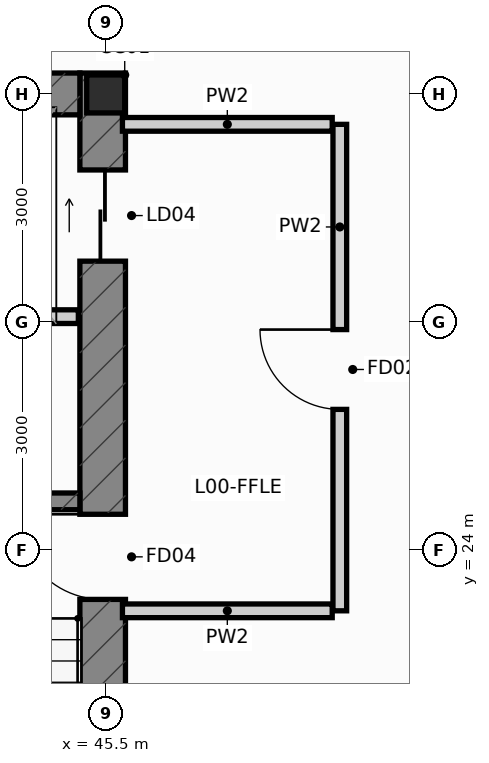
"""IFC4 building model, lengths in metres.
Left out: names, types, materials, properties, quantities, classifications, styles, units other than length and angle.
Written with IfcOpenShell. Run it as: python <this file> out.ifc"""

import sys

from ifc_helpers import new_model, si_unit, direction, frame, frame_2d, origin, origin_2d, place, context, subcontext, project, spatial, rectangle, i_section, extrude, source, transform, mapped, element, fill, save


model = new_model("IFC4")
c1 = context("Model", 3, precision=1e-05, world=origin(), true_north=direction((0.0, 1.0)))
c2 = subcontext(c1, "Body", "Model", "MODEL_VIEW")
j1 = project(units=[si_unit("LENGTHUNIT", "METRE"), si_unit("PLANEANGLEUNIT", "RADIAN")], contexts=[c1])
p1 = place(None, origin())
s1 = spatial("IfcSite", under=j1, at=p1, CompositionType="ELEMENT")
p2 = place(p1, origin())
s2 = spatial("IfcBuilding", under=s1, at=p2, CompositionType="ELEMENT")
p3 = place(p2, origin())
s3 = spatial("IfcBuildingStorey", under=s2, at=p3, CompositionType="ELEMENT", Elevation=0.0)
m1 = source(origin(), c2, "Body", "SweptSolid", [
    extrude(i_section(OverallWidth=0.5, OverallDepth=0.5, WebThickness=0.028, FlangeThickness=0.04, at=origin_2d()), origin(), (0.0, 0.0, 1.0), 5.4),
])
p4 = place(p3, frame((45.5, 30.0, 0.0), z_axis=(0.0, 0.0, 1.0), x_axis=(1.0, 0.0, 0.0)))
e1 = element("IfcColumn", 1, at=p4, inside=s3, PredefinedType="COLUMN", context=c2, shape_type="MappedRepresentation", body=[
    mapped(m1, transform((0.0, 0.0, 0.0), scale=1.0)),
])
p5 = place(p3, frame((45.46, 16.85, 0.0), z_axis=(0.0, 0.0, 1.0), x_axis=(0.0, 1.0, 0.0)))
e2 = element("IfcWall", 2, at=p5, inside=s3, PredefinedType="SHEAR", context=c2, shape_type="SweptSolid", body=[
    extrude(rectangle(XDim=13.425, YDim=0.6, at=frame_2d((6.712, 0.0))), origin(), (0.0, 0.0, 1.0), 5.4),
])
p6 = place(p5, frame((6.5, 0.0, 0.0)))
e3 = element("IfcOpeningElement", 3, at=p6, cuts=e2, PredefinedType="OPENING", context=c2, shape_type="SweptSolid", body=[
    extrude(rectangle(XDim=1.12, YDim=2.15, at=frame_2d((0.56, 1.075))), frame((0.0, 0.312, 0.0), z_axis=(0.0, -1.0, 0.0), x_axis=(1.0, 0.0, 0.0)), (0.0, 0.0, 1.0), 0.624),
])
p7 = place(p5, frame((10.95, 0.0, 0.0)))
e4 = element("IfcOpeningElement", 4, at=p7, cuts=e2, PredefinedType="OPENING", context=c2, shape_type="SweptSolid", body=[
    extrude(rectangle(XDim=1.2, YDim=2.2, at=frame_2d((0.6, 1.1))), frame((0.0, 0.312, 0.0), z_axis=(0.0, -1.0, 0.0), x_axis=(1.0, 0.0, 0.0)), (0.0, 0.0, 1.0), 0.624),
])
p8 = place(p3, frame((42.26, 30.0, 0.0), z_axis=(0.0, 0.0, 1.0), x_axis=(1.0, 0.0, 0.0)))
e5 = element("IfcWall", 5, at=p8, inside=s3, PredefinedType="SHEAR", context=c2, shape_type="SweptSolid", body=[
    extrude(rectangle(XDim=2.9, YDim=0.55, at=frame_2d((1.45, 0.0))), origin(), (0.0, 0.0, 1.0), 5.4),
])
p9 = place(p3, frame((42.26, 24.64, 0.0), z_axis=(0.0, 0.0, 1.0), x_axis=(1.0, 0.0, 0.0)))
e6 = element("IfcWall", 6, at=p9, inside=s3, PredefinedType="SHEAR", context=c2, shape_type="SweptSolid", body=[
    extrude(rectangle(XDim=2.9, YDim=0.22, at=frame_2d((1.45, 0.0))), origin(), (0.0, 0.0, 1.0), 5.4),
])
p10 = place(p3, frame((48.58, 23.2, 0.0), z_axis=(0.0, 0.0, 1.0), x_axis=(0.0, 1.0, 0.0)))
e7 = element("IfcWall", 7, at=p10, inside=s3, PredefinedType="PARTITIONING", context=c2, shape_type="SweptSolid", body=[
    extrude(rectangle(XDim=6.4, YDim=0.18, at=frame_2d((3.2, 0.0))), origin(), (0.0, 0.0, 1.0), 5.08),
])
p11 = place(p10, frame((2.65, 0.0, 0.0)))
e8 = element("IfcOpeningElement", 8, at=p11, cuts=e7, PredefinedType="OPENING", context=c2, shape_type="SweptSolid", body=[
    extrude(rectangle(XDim=1.05, YDim=2.15, at=frame_2d((0.525, 1.075))), frame((0.0, 0.102, 0.0), z_axis=(0.0, -1.0, 0.0), x_axis=(1.0, 0.0, 0.0)), (0.0, 0.0, 1.0), 0.204),
])
p12 = place(p3, frame((45.72, 23.2, 0.0), z_axis=(0.0, 0.0, 1.0), x_axis=(1.0, 0.0, 0.0)))
e9 = element("IfcWall", 9, at=p12, inside=s3, PredefinedType="PARTITIONING", context=c2, shape_type="SweptSolid", body=[
    extrude(rectangle(XDim=2.76, YDim=0.18, at=frame_2d((1.38, 0.0))), origin(), (0.0, 0.0, 1.0), 5.08),
])
p13 = place(p3, frame((45.72, 29.6, 0.0), z_axis=(0.0, 0.0, 1.0), x_axis=(1.0, 0.0, 0.0)))
e10 = element("IfcWall", 10, at=p13, inside=s3, PredefinedType="PARTITIONING", context=c2, shape_type="SweptSolid", body=[
    extrude(rectangle(XDim=2.76, YDim=0.18, at=frame_2d((1.38, 0.0))), origin(), (0.0, 0.0, 1.0), 4.453),
])
p14 = place(p3, frame((42.24, 27.07, 0.0), z_axis=(0.0, 0.0, 1.0), x_axis=(1.0, 0.0, 0.0)))
e11 = element("IfcWall", 11, at=p14, inside=s3, PredefinedType="PARTITIONING", context=c2, shape_type="SweptSolid", body=[
    extrude(rectangle(XDim=2.9, YDim=0.18, at=frame_2d((1.45, 0.0))), origin(), (0.0, 0.0, 1.0), 5.08),
])
p15 = place(p6, origin())
e12 = element("IfcDoor", 12, at=p15, inside=s3, OperationType="SINGLE_SWING_RIGHT", PredefinedType="DOOR", context=c2, shape_type="SweptSolid", body=[
    extrude(rectangle(XDim=1.12, YDim=2.15, at=frame_2d((0.56, 1.075))), frame((0.0, 0.025, 0.0), z_axis=(0.0, -1.0, 0.0), x_axis=(1.0, 0.0, 0.0)), (0.0, 0.0, 1.0), 0.05),
])
fill(e3, e12)
p16 = place(p7, origin())
e13 = element("IfcDoor", 13, at=p16, inside=s3, OperationType="SLIDING_TO_RIGHT", PredefinedType="DOOR", context=c2, shape_type="SweptSolid", body=[
    extrude(rectangle(XDim=1.2, YDim=2.2, at=frame_2d((0.6, 1.1))), frame((0.0, 0.025, 0.0), z_axis=(0.0, -1.0, 0.0), x_axis=(1.0, 0.0, 0.0)), (0.0, 0.0, 1.0), 0.05),
])
fill(e4, e13)
p17 = place(p11, origin())
e14 = element("IfcDoor", 14, at=p17, inside=s3, OperationType="SINGLE_SWING_RIGHT", PredefinedType="DOOR", context=c2, shape_type="SweptSolid", body=[
    extrude(rectangle(XDim=1.05, YDim=2.15, at=frame_2d((0.525, 1.075))), frame((0.0, 0.025, 0.0), z_axis=(0.0, -1.0, 0.0), x_axis=(1.0, 0.0, 0.0)), (0.0, 0.0, 1.0), 0.05),
])
fill(e8, e14)
save(model, sys.argv[1])
